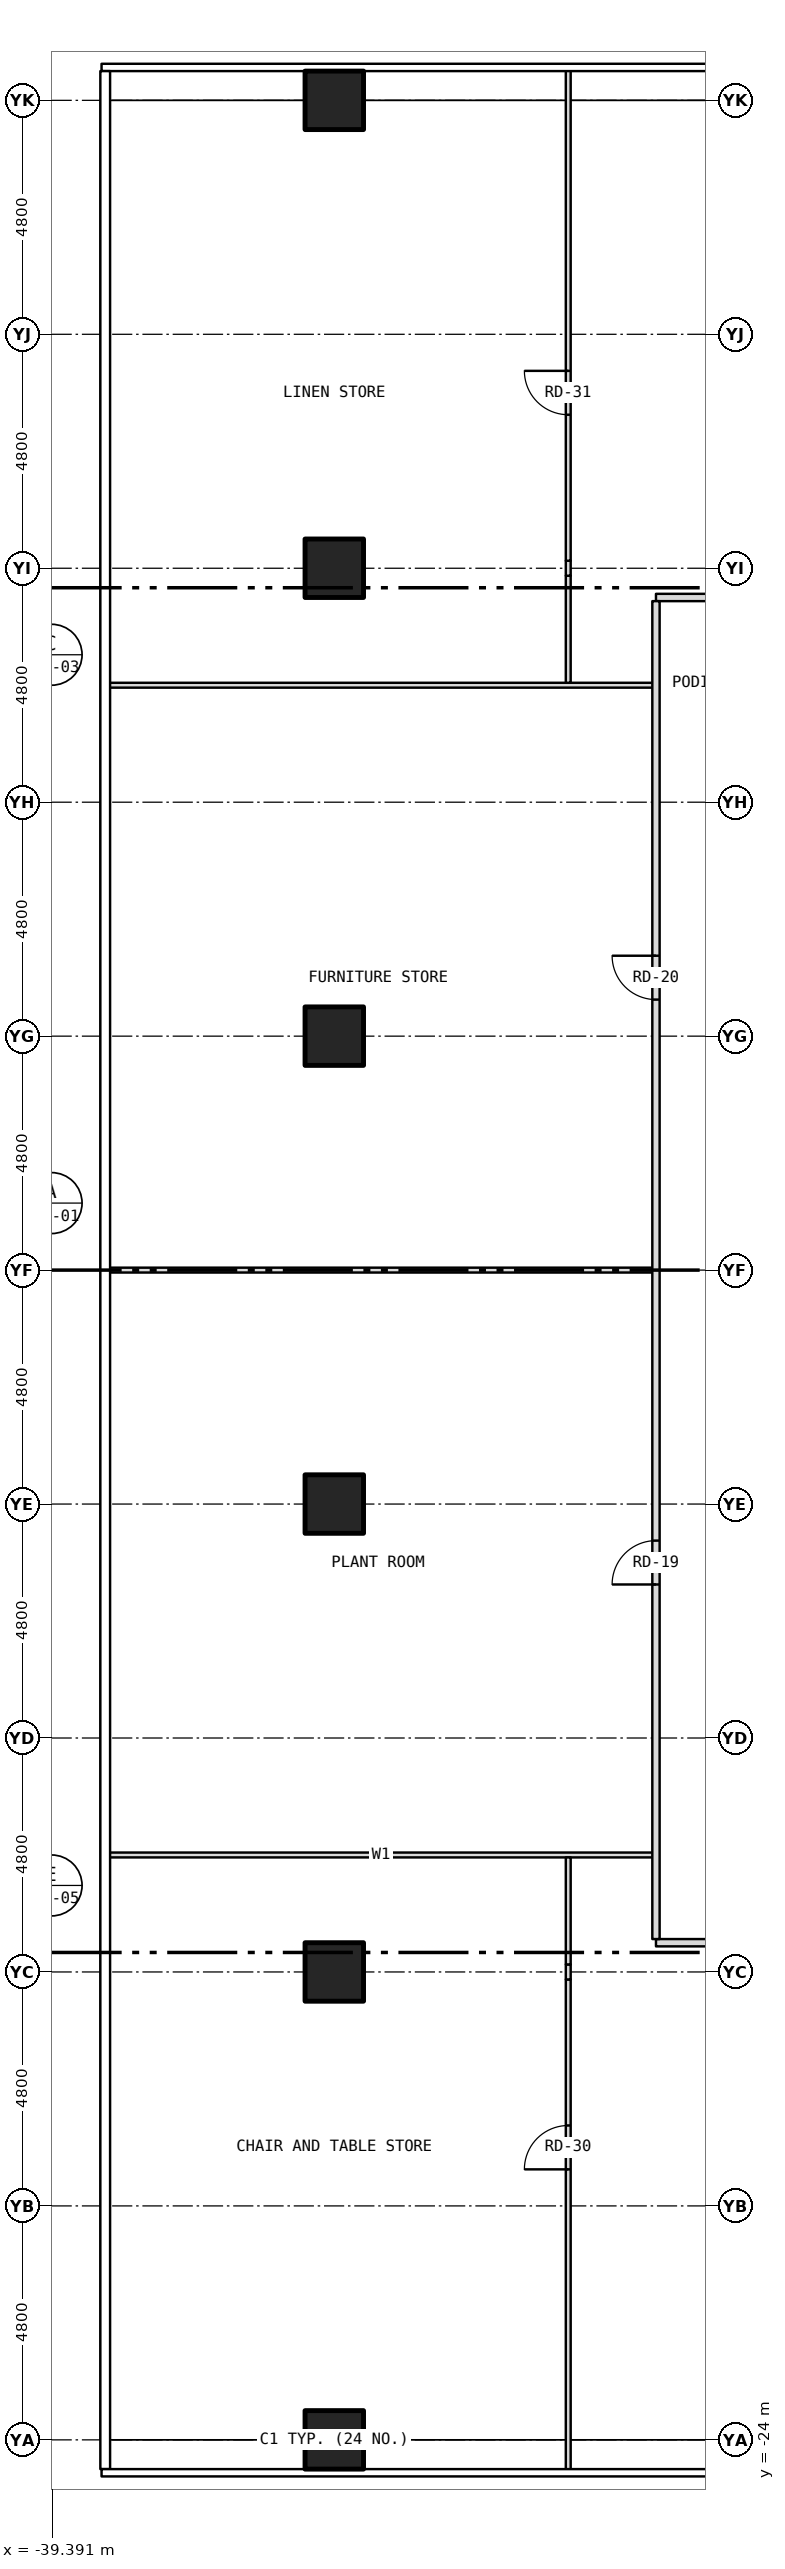
"""IFC4 building model, lengths in metres.
Left out: names, types, materials, properties, quantities, classifications, styles, units other than length and angle.
Written with IfcOpenShell. Run it as: python <this file> out.ifc"""

import sys

from ifc_helpers import new_model, si_unit, direction, frame, frame_2d, origin, origin_2d, place, context, subcontext, project, spatial, rectangle, hollow_rectangle, extrude, element, fill, save


model = new_model("IFC4")
c1 = context("Model", 3, precision=1e-05, world=origin(), true_north=direction((0.0, 1.0)))
c2 = subcontext(c1, "Body", "Model", "MODEL_VIEW")
j1 = project(units=[si_unit("LENGTHUNIT", "METRE"), si_unit("PLANEANGLEUNIT", "RADIAN")], contexts=[c1])
p1 = place(None, origin())
s1 = spatial("IfcSite", under=j1, at=p1, CompositionType="ELEMENT")
p2 = place(p1, origin())
s2 = spatial("IfcBuilding", under=s1, at=p2, CompositionType="ELEMENT")
p3 = place(p2, frame((0.0, 0.0, 7.5)))
s3 = spatial("IfcBuildingStorey", under=s2, at=p3, CompositionType="ELEMENT", Elevation=7.5)
for number, where, z_axis, x_axis in (
    (1, (-33.6, -24.0, -0.25), (0.0, 0.0, 1.0), (1.0, 0.0, 0.0)),
    (2, (-33.6, -14.4, -0.25), (0.0, 0.0, 1.0), (1.0, 0.0, 0.0)),
    (3, (-33.6, -4.8, -0.25), (0.0, 0.0, 1.0), (1.0, 0.0, 0.0)),
    (4, (-33.6, 4.8, -0.25), (0.0, 0.0, 1.0), (1.0, 0.0, 0.0)),
    (5, (-33.6, 14.4, -0.25), (0.0, 0.0, 1.0), (1.0, 0.0, 0.0)),
    (6, (-33.6, 24.0, -0.25), (0.0, 0.0, 1.0), (1.0, 0.0, 0.0)),
):
    element("IfcColumn", number, at=place(p3, frame(where, z_axis=z_axis, x_axis=x_axis)), inside=s3, PredefinedType="COLUMN", context=c2, shape_type="SweptSolid", body=[
        extrude(hollow_rectangle(XDim=1.2, YDim=1.2, WallThickness=0.07, at=origin_2d()), origin(), (0.0, 0.0, 1.0), 8.05),
    ])
p4 = place(p3, frame((-27.0, -13.8, 0.0), z_axis=(0.0, 0.0, 1.0), x_axis=(1.0, 0.0, 0.0)))
e7 = element("IfcWall", 7, at=p4, inside=s3, PredefinedType="PARTITIONING", context=c2, shape_type="SweptSolid", body=[
    extrude(rectangle(XDim=54.0, YDim=0.15, at=frame_2d((27.0, 0.0))), origin(), (0.0, 0.0, 1.0), 7.8),
])
p5 = place(p4, frame((9.03, 0.0, 0.0)))
e8 = element("IfcOpeningElement", 8, at=p5, cuts=e7, PredefinedType="OPENING", context=c2, shape_type="SweptSolid", body=[
    extrude(rectangle(XDim=0.9, YDim=2.1, at=frame_2d((0.45, 1.05))), frame((0.0, 0.087, 0.0), z_axis=(0.0, -1.0, 0.0), x_axis=(1.0, 0.0, 0.0)), (0.0, 0.0, 1.0), 0.174),
])
p6 = place(p4, frame((11.08, 0.0, 0.0)))
e9 = element("IfcOpeningElement", 9, at=p6, cuts=e7, PredefinedType="OPENING", context=c2, shape_type="SweptSolid", body=[
    extrude(rectangle(XDim=0.9, YDim=2.1, at=frame_2d((0.45, 1.05))), frame((0.0, 0.087, 0.0), z_axis=(0.0, -1.0, 0.0), x_axis=(1.0, 0.0, 0.0)), (0.0, 0.0, 1.0), 0.174),
])
p7 = place(p4, frame((19.891, 0.0, 0.0)))
e10 = element("IfcOpeningElement", 10, at=p7, cuts=e7, PredefinedType="OPENING", context=c2, shape_type="SweptSolid", body=[
    extrude(rectangle(XDim=0.9, YDim=2.1, at=frame_2d((0.45, 1.05))), frame((0.0, 0.087, 0.0), z_axis=(0.0, -1.0, 0.0), x_axis=(1.0, 0.0, 0.0)), (0.0, 0.0, 1.0), 0.174),
])
p8 = place(p4, frame((30.274, 0.0, 0.0)))
e11 = element("IfcOpeningElement", 11, at=p8, cuts=e7, PredefinedType="OPENING", context=c2, shape_type="SweptSolid", body=[
    extrude(rectangle(XDim=0.9, YDim=2.1, at=frame_2d((0.45, 1.05))), frame((0.0, 0.087, 0.0), z_axis=(0.0, -1.0, 0.0), x_axis=(1.0, 0.0, 0.0)), (0.0, 0.0, 1.0), 0.174),
])
p9 = place(p4, frame((3.75, 0.0, 0.0)))
e12 = element("IfcOpeningElement", 12, at=p9, cuts=e7, PredefinedType="OPENING", context=c2, shape_type="SweptSolid", body=[
    extrude(rectangle(XDim=0.9, YDim=2.1, at=frame_2d((0.45, 1.05))), frame((0.0, 0.087, 0.0), z_axis=(0.0, -1.0, 0.0), x_axis=(1.0, 0.0, 0.0)), (0.0, 0.0, 1.0), 0.174),
])
p10 = place(p4, frame((49.35, 0.0, 0.0)))
e13 = element("IfcOpeningElement", 13, at=p10, cuts=e7, PredefinedType="OPENING", context=c2, shape_type="SweptSolid", body=[
    extrude(rectangle(XDim=0.9, YDim=2.1, at=frame_2d((0.45, 1.05))), frame((0.0, 0.087, 0.0), z_axis=(0.0, -1.0, 0.0), x_axis=(1.0, 0.0, 0.0)), (0.0, 0.0, 1.0), 0.174),
])
p11 = place(p4, frame((42.15, 0.0, 0.0)))
e14 = element("IfcOpeningElement", 14, at=p11, cuts=e7, PredefinedType="OPENING", context=c2, shape_type="SweptSolid", body=[
    extrude(rectangle(XDim=0.9, YDim=2.1, at=frame_2d((0.45, 1.05))), frame((0.0, 0.087, 0.0), z_axis=(0.0, -1.0, 0.0), x_axis=(1.0, 0.0, 0.0)), (0.0, 0.0, 1.0), 0.174),
])
p12 = place(p4, frame((15.239, 0.0, 0.0)))
e15 = element("IfcOpeningElement", 15, at=p12, cuts=e7, PredefinedType="OPENING", context=c2, shape_type="SweptSolid", body=[
    extrude(rectangle(XDim=0.9, YDim=2.1, at=frame_2d((0.45, 1.05))), frame((0.0, 0.087, 0.0), z_axis=(0.0, -1.0, 0.0), x_axis=(1.0, 0.0, 0.0)), (0.0, 0.0, 1.0), 0.174),
])
for number, where, z_axis, x_axis in (
    (16, (-38.28, -12.0, 0.0), (0.0, 0.0, 1.0), (1.0, 0.0, 0.0)),
    (17, (-38.28, 0.0, 0.0), (0.0, 0.0, 1.0), (1.0, 0.0, 0.0)),
    (18, (-38.28, 12.0, 0.0), (0.0, 0.0, 1.0), (1.0, 0.0, 0.0)),
):
    element("IfcWall", number, at=place(p3, frame(where, z_axis=z_axis, x_axis=x_axis)), inside=s3, PredefinedType="PARTITIONING", context=c2, shape_type="SweptSolid", body=[
        extrude(rectangle(XDim=11.28, YDim=0.1, at=frame_2d((5.64, 0.0))), origin(), (0.0, 0.0, 1.0), 7.8),
    ])
p13 = place(p3, frame((-27.0, 13.8, 0.0), z_axis=(0.0, 0.0, 1.0), x_axis=(1.0, 0.0, 0.0)))
e19 = element("IfcWall", 19, at=p13, inside=s3, PredefinedType="PARTITIONING", context=c2, shape_type="SweptSolid", body=[
    extrude(rectangle(XDim=54.0, YDim=0.15, at=frame_2d((27.0, 0.0))), origin(), (0.0, 0.0, 1.0), 7.8),
])
p14 = place(p13, frame((13.35, 0.0, 0.0)))
e20 = element("IfcOpeningElement", 20, at=p14, cuts=e19, PredefinedType="OPENING", context=c2, shape_type="SweptSolid", body=[
    extrude(rectangle(XDim=0.9, YDim=2.1, at=frame_2d((0.45, 1.05))), frame((0.0, 0.087, 0.0), z_axis=(0.0, -1.0, 0.0), x_axis=(1.0, 0.0, 0.0)), (0.0, 0.0, 1.0), 0.174),
])
p15 = place(p13, frame((22.846, 0.0, 0.0)))
e21 = element("IfcOpeningElement", 21, at=p15, cuts=e19, PredefinedType="OPENING", context=c2, shape_type="SweptSolid", body=[
    extrude(rectangle(XDim=0.9, YDim=2.1, at=frame_2d((0.45, 1.05))), frame((0.0, 0.087, 0.0), z_axis=(0.0, -1.0, 0.0), x_axis=(1.0, 0.0, 0.0)), (0.0, 0.0, 1.0), 0.174),
])
p16 = place(p13, frame((28.756, 0.0, 0.0)))
e22 = element("IfcOpeningElement", 22, at=p16, cuts=e19, PredefinedType="OPENING", context=c2, shape_type="SweptSolid", body=[
    extrude(rectangle(XDim=0.9, YDim=2.1, at=frame_2d((0.45, 1.05))), frame((0.0, 0.087, 0.0), z_axis=(0.0, -1.0, 0.0), x_axis=(1.0, 0.0, 0.0)), (0.0, 0.0, 1.0), 0.174),
])
p17 = place(p13, frame((33.556, 0.0, 0.0)))
e23 = element("IfcOpeningElement", 23, at=p17, cuts=e19, PredefinedType="OPENING", context=c2, shape_type="SweptSolid", body=[
    extrude(rectangle(XDim=0.9, YDim=2.1, at=frame_2d((0.45, 1.05))), frame((0.0, 0.087, 0.0), z_axis=(0.0, -1.0, 0.0), x_axis=(1.0, 0.0, 0.0)), (0.0, 0.0, 1.0), 0.174),
])
p18 = place(p13, frame((42.768, 0.0, 0.0)))
e24 = element("IfcOpeningElement", 24, at=p18, cuts=e19, PredefinedType="OPENING", context=c2, shape_type="SweptSolid", body=[
    extrude(rectangle(XDim=0.9, YDim=2.1, at=frame_2d((0.45, 1.05))), frame((0.0, 0.087, 0.0), z_axis=(0.0, -1.0, 0.0), x_axis=(1.0, 0.0, 0.0)), (0.0, 0.0, 1.0), 0.174),
])
p19 = place(p13, frame((3.75, 0.0, 0.0)))
e25 = element("IfcOpeningElement", 25, at=p19, cuts=e19, PredefinedType="OPENING", context=c2, shape_type="SweptSolid", body=[
    extrude(rectangle(XDim=0.9, YDim=2.1, at=frame_2d((0.45, 1.05))), frame((0.0, 0.087, 0.0), z_axis=(0.0, -1.0, 0.0), x_axis=(1.0, 0.0, 0.0)), (0.0, 0.0, 1.0), 0.174),
])
p20 = place(p13, frame((49.35, 0.0, 0.0)))
e26 = element("IfcOpeningElement", 26, at=p20, cuts=e19, PredefinedType="OPENING", context=c2, shape_type="SweptSolid", body=[
    extrude(rectangle(XDim=0.9, YDim=2.1, at=frame_2d((0.45, 1.05))), frame((0.0, 0.087, 0.0), z_axis=(0.0, -1.0, 0.0), x_axis=(1.0, 0.0, 0.0)), (0.0, 0.0, 1.0), 0.174),
])
p21 = place(p13, frame((25.283, 0.0, 0.0)))
e27 = element("IfcOpeningElement", 27, at=p21, cuts=e19, PredefinedType="OPENING", context=c2, shape_type="SweptSolid", body=[
    extrude(rectangle(XDim=0.9, YDim=2.1, at=frame_2d((0.45, 1.05))), frame((0.0, 0.087, 0.0), z_axis=(0.0, -1.0, 0.0), x_axis=(1.0, 0.0, 0.0)), (0.0, 0.0, 1.0), 0.174),
])
p22 = place(p3, frame((-28.8, -24.63, 0.0), z_axis=(0.0, 0.0, 1.0), x_axis=(0.0, 1.0, 0.0)))
e28 = element("IfcWall", 28, at=p22, inside=s3, PredefinedType="PARTITIONING", context=c2, shape_type="SweptSolid", body=[
    extrude(rectangle(XDim=10.076, YDim=0.1, at=frame_2d((5.038, 0.0))), origin(), (0.0, 0.0, 1.0), 7.183),
])
p23 = place(p22, frame((6.18, 0.0, 0.0)))
e29 = element("IfcOpeningElement", 29, at=p23, cuts=e28, PredefinedType="OPENING", context=c2, shape_type="SweptSolid", body=[
    extrude(rectangle(XDim=0.9, YDim=2.1, at=frame_2d((0.45, 1.05))), frame((0.0, 0.062, 0.0), z_axis=(0.0, -1.0, 0.0), x_axis=(1.0, 0.0, 0.0)), (0.0, 0.0, 1.0), 0.124),
])
p24 = place(p3, frame((-28.8, -14.554, 0.0), z_axis=(0.0, 0.0, 1.0), x_axis=(0.0, 1.0, 0.0)))
e30 = element("IfcWall", 30, at=p24, inside=s3, PredefinedType="PARTITIONING", context=c2, shape_type="SweptSolid", body=[
    extrude(rectangle(XDim=0.308, YDim=0.1, at=frame_2d((0.154, 0.0))), origin(), (0.0, 0.0, 1.0), 7.8),
])
for number, where, z_axis, x_axis in (
    (31, (-28.8, -14.246, 0.0), (0.0, 0.0, 1.0), (0.0, 1.0, 0.0)),
    (32, (-28.8, 12.05, 0.0), (0.0, 0.0, 1.0), (0.0, 1.0, 0.0)),
):
    element("IfcWall", number, at=place(p3, frame(where, z_axis=z_axis, x_axis=x_axis)), inside=s3, PredefinedType="PARTITIONING", context=c2, shape_type="SweptSolid", body=[
        extrude(rectangle(XDim=2.196, YDim=0.1, at=frame_2d((1.098, 0.0))), origin(), (0.0, 0.0, 1.0), 7.183),
    ])
p25 = place(p3, frame((-28.8, 14.246, 0.0), z_axis=(0.0, 0.0, 1.0), x_axis=(0.0, 1.0, 0.0)))
e33 = element("IfcWall", 33, at=p25, inside=s3, PredefinedType="PARTITIONING", context=c2, shape_type="SweptSolid", body=[
    extrude(rectangle(XDim=0.308, YDim=0.1, at=frame_2d((0.154, 0.0))), origin(), (0.0, 0.0, 1.0), 7.8),
])
p26 = place(p3, frame((-28.8, 14.554, 0.0), z_axis=(0.0, 0.0, 1.0), x_axis=(0.0, 1.0, 0.0)))
e34 = element("IfcWall", 34, at=p26, inside=s3, PredefinedType="PARTITIONING", context=c2, shape_type="SweptSolid", body=[
    extrude(rectangle(XDim=10.076, YDim=0.1, at=frame_2d((5.038, 0.0))), origin(), (0.0, 0.0, 1.0), 7.183),
])
p27 = place(p26, frame((2.996, 0.0, 0.0)))
e35 = element("IfcOpeningElement", 35, at=p27, cuts=e34, PredefinedType="OPENING", context=c2, shape_type="SweptSolid", body=[
    extrude(rectangle(XDim=0.9, YDim=2.1, at=frame_2d((0.45, 1.05))), frame((0.0, 0.062, 0.0), z_axis=(0.0, -1.0, 0.0), x_axis=(1.0, 0.0, 0.0)), (0.0, 0.0, 1.0), 0.124),
])
p28 = place(p3, frame((-27.0, -13.725, 0.0), z_axis=(0.0, 0.0, 1.0), x_axis=(0.0, 1.0, 0.0)))
e36 = element("IfcWall", 36, at=p28, inside=s3, PredefinedType="PARTITIONING", context=c2, shape_type="SweptSolid", body=[
    extrude(rectangle(XDim=27.45, YDim=0.15, at=frame_2d((13.725, 0.0))), origin(), (0.0, 0.0, 1.0), 7.8),
])
p29 = place(p28, frame((7.275, 0.0, 0.0)))
e37 = element("IfcOpeningElement", 37, at=p29, cuts=e36, PredefinedType="OPENING", context=c2, shape_type="SweptSolid", body=[
    extrude(rectangle(XDim=0.9, YDim=2.1, at=frame_2d((0.45, 1.05))), frame((0.0, 0.087, 0.0), z_axis=(0.0, -1.0, 0.0), x_axis=(1.0, 0.0, 0.0)), (0.0, 0.0, 1.0), 0.174),
])
p30 = place(p28, frame((19.275, 0.0, 0.0)))
e38 = element("IfcOpeningElement", 38, at=p30, cuts=e36, PredefinedType="OPENING", context=c2, shape_type="SweptSolid", body=[
    extrude(rectangle(XDim=0.9, YDim=2.1, at=frame_2d((0.45, 1.05))), frame((0.0, 0.087, 0.0), z_axis=(0.0, -1.0, 0.0), x_axis=(1.0, 0.0, 0.0)), (0.0, 0.0, 1.0), 0.174),
])
p31 = place(p29, origin())
e39 = element("IfcDoor", 39, at=p31, inside=s3, OperationType="SINGLE_SWING_LEFT", PredefinedType="DOOR", context=c2, shape_type="SweptSolid", body=[
    extrude(rectangle(XDim=0.9, YDim=2.1, at=frame_2d((0.45, 1.05))), frame((0.0, 0.025, 0.0), z_axis=(0.0, -1.0, 0.0), x_axis=(1.0, 0.0, 0.0)), (0.0, 0.0, 1.0), 0.05),
])
fill(e37, e39)
p32 = place(p30, origin())
e40 = element("IfcDoor", 40, at=p32, inside=s3, OperationType="SINGLE_SWING_RIGHT", PredefinedType="DOOR", context=c2, shape_type="SweptSolid", body=[
    extrude(rectangle(XDim=0.9, YDim=2.1, at=frame_2d((0.45, 1.05))), frame((0.0, 0.025, 0.0), z_axis=(0.0, -1.0, 0.0), x_axis=(1.0, 0.0, 0.0)), (0.0, 0.0, 1.0), 0.05),
])
fill(e38, e40)
p33 = place(p23, origin())
e41 = element("IfcDoor", 41, at=p33, inside=s3, OperationType="SINGLE_SWING_LEFT", PredefinedType="DOOR", context=c2, shape_type="SweptSolid", body=[
    extrude(rectangle(XDim=0.9, YDim=2.1, at=frame_2d((0.45, 1.05))), frame((0.0, 0.025, 0.0), z_axis=(0.0, -1.0, 0.0), x_axis=(1.0, 0.0, 0.0)), (0.0, 0.0, 1.0), 0.05),
])
fill(e29, e41)
p34 = place(p27, origin())
e42 = element("IfcDoor", 42, at=p34, inside=s3, OperationType="SINGLE_SWING_RIGHT", PredefinedType="DOOR", context=c2, shape_type="SweptSolid", body=[
    extrude(rectangle(XDim=0.9, YDim=2.1, at=frame_2d((0.45, 1.05))), frame((0.0, 0.025, 0.0), z_axis=(0.0, -1.0, 0.0), x_axis=(1.0, 0.0, 0.0)), (0.0, 0.0, 1.0), 0.05),
])
fill(e35, e42)
save(model, sys.argv[1])
